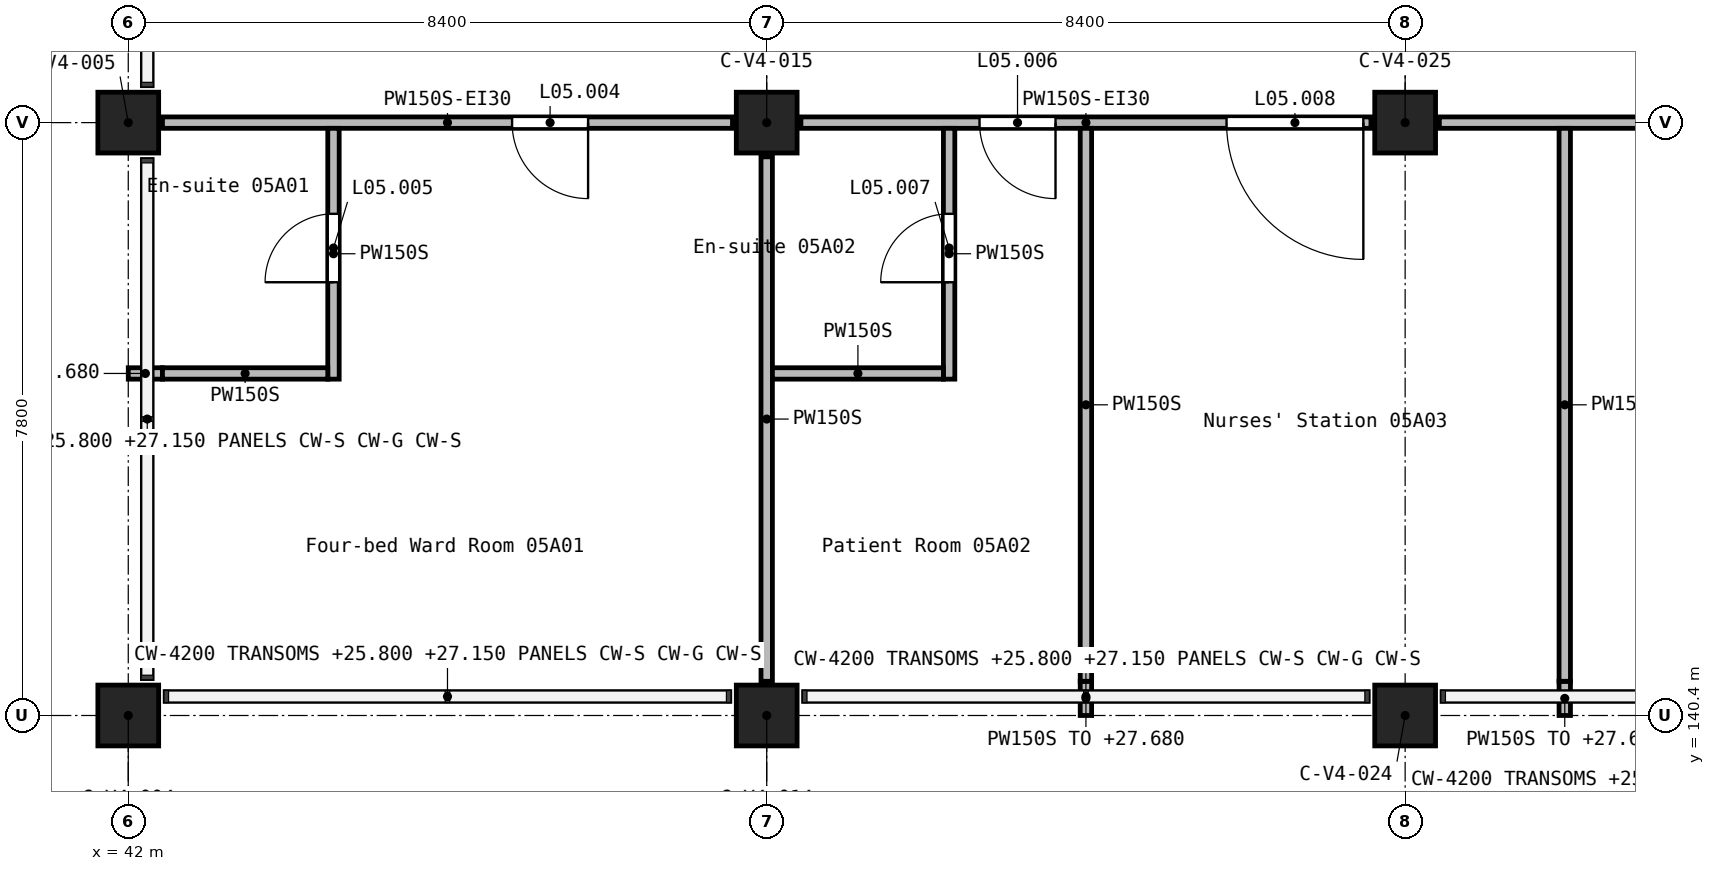
"""IFC4 building model, lengths in metres.
Left out: names, types, materials, properties, quantities, classifications, styles, units other than length and angle.
Written with IfcOpenShell. Run it as: python <this file> out.ifc"""

import sys

from ifc_helpers import new_model, si_unit, direction, frame, frame_2d, origin, origin_2d, place, context, subcontext, project, spatial, rectangle, extrude, element, fill, save


model = new_model("IFC4")
c1 = context("Model", 3, precision=1e-05, world=origin(), true_north=direction((0.0, 1.0)))
c2 = subcontext(c1, "Body", "Model", "MODEL_VIEW")
j1 = project(units=[si_unit("LENGTHUNIT", "METRE"), si_unit("PLANEANGLEUNIT", "RADIAN")], contexts=[c1])
p1 = place(None, origin())
s1 = spatial("IfcSite", under=j1, at=p1, CompositionType="ELEMENT")
p2 = place(p1, origin())
s2 = spatial("IfcBuilding", under=s1, at=p2, CompositionType="ELEMENT")
p3 = place(p2, frame((0.0, 0.0, 24.9)))
s3 = spatial("IfcBuildingStorey", under=s2, at=p3, CompositionType="ELEMENT", Elevation=24.9)
for number, where, z_axis, x_axis in (
    (1, (42.0, 140.4, 0.0), (0.0, 0.0, 1.0), (1.0, 0.0, 0.0)),
    (2, (42.0, 148.2, 0.0), (0.0, 0.0, 1.0), (1.0, 0.0, 0.0)),
    (3, (50.4, 140.4, 0.0), (0.0, 0.0, 1.0), (1.0, 0.0, 0.0)),
    (4, (50.4, 148.2, 0.0), (0.0, 0.0, 1.0), (1.0, 0.0, 0.0)),
    (5, (58.8, 140.4, 0.0), (0.0, 0.0, 1.0), (1.0, 0.0, 0.0)),
    (6, (58.8, 148.2, 0.0), (0.0, 0.0, 1.0), (1.0, 0.0, 0.0)),
):
    element("IfcColumn", number, at=place(p3, frame(where, z_axis=z_axis, x_axis=x_axis)), inside=s3, PredefinedType="COLUMN", context=c2, shape_type="SweptSolid", body=[
        extrude(rectangle(XDim=0.8, YDim=0.8, at=origin_2d()), origin(), (0.0, 0.0, 1.0), 3.9),
    ])
p4 = place(p3, frame((66.75, 148.2, 0.0), z_axis=(0.0, 0.0, 1.0), x_axis=(-1.0, 0.0, 0.0)))
e7 = element("IfcWall", 7, at=p4, inside=s3, PredefinedType="PARTITIONING", context=c2, shape_type="SweptSolid", body=[
    extrude(rectangle(XDim=7.5, YDim=0.15, at=frame_2d((3.75, 0.0))), origin(), (0.0, 0.0, 1.0), 3.6),
])
p5 = place(p4, frame((3.55, 0.0, 0.0)))
e8 = element("IfcOpeningElement", 8, at=p5, cuts=e7, PredefinedType="OPENING", context=c2, shape_type="SweptSolid", body=[
    extrude(rectangle(XDim=1.0, YDim=2.1, at=frame_2d((0.5, 1.05))), frame((0.0, 0.085, 0.0), z_axis=(0.0, -1.0, 0.0), x_axis=(1.0, 0.0, 0.0)), (0.0, 0.0, 1.0), 0.17),
])
p6 = place(p3, frame((58.35, 148.2, 0.0), z_axis=(0.0, 0.0, 1.0), x_axis=(-1.0, 0.0, 0.0)))
e9 = element("IfcWall", 9, at=p6, inside=s3, PredefinedType="PARTITIONING", context=c2, shape_type="SweptSolid", body=[
    extrude(rectangle(XDim=7.5, YDim=0.15, at=frame_2d((3.75, 0.0))), origin(), (0.0, 0.0, 1.0), 3.6),
])
p7 = place(p6, frame((4.15, 0.0, 0.0)))
e10 = element("IfcOpeningElement", 10, at=p7, cuts=e9, PredefinedType="OPENING", context=c2, shape_type="SweptSolid", body=[
    extrude(rectangle(XDim=1.0, YDim=2.1, at=frame_2d((0.5, 1.05))), frame((0.0, 0.085, 0.0), z_axis=(0.0, -1.0, 0.0), x_axis=(1.0, 0.0, 0.0)), (0.0, 0.0, 1.0), 0.17),
])
p8 = place(p6, frame((0.1, 0.0, 0.0)))
e11 = element("IfcOpeningElement", 11, at=p8, cuts=e9, PredefinedType="OPENING", context=c2, shape_type="SweptSolid", body=[
    extrude(rectangle(XDim=1.8, YDim=2.1, at=frame_2d((0.9, 1.05))), frame((0.0, 0.085, 0.0), z_axis=(0.0, -1.0, 0.0), x_axis=(1.0, 0.0, 0.0)), (0.0, 0.0, 1.0), 0.17),
])
p9 = place(p3, frame((49.95, 148.2, 0.0), z_axis=(0.0, 0.0, 1.0), x_axis=(-1.0, 0.0, 0.0)))
e12 = element("IfcWall", 12, at=p9, inside=s3, PredefinedType="PARTITIONING", context=c2, shape_type="SweptSolid", body=[
    extrude(rectangle(XDim=7.5, YDim=0.15, at=frame_2d((3.75, 0.0))), origin(), (0.0, 0.0, 1.0), 3.6),
])
p10 = place(p9, frame((1.9, 0.0, 0.0)))
e13 = element("IfcOpeningElement", 13, at=p10, cuts=e12, PredefinedType="OPENING", context=c2, shape_type="SweptSolid", body=[
    extrude(rectangle(XDim=1.0, YDim=2.1, at=frame_2d((0.5, 1.05))), frame((0.0, 0.085, 0.0), z_axis=(0.0, -1.0, 0.0), x_axis=(1.0, 0.0, 0.0)), (0.0, 0.0, 1.0), 0.17),
])
p11 = place(p3, frame((50.4, 140.85, 0.0), z_axis=(0.0, 0.0, 1.0), x_axis=(0.0, 1.0, 0.0)))
e14 = element("IfcWall", 14, at=p11, inside=s3, PredefinedType="PARTITIONING", context=c2, shape_type="SweptSolid", body=[
    extrude(rectangle(XDim=6.9, YDim=0.15, at=frame_2d((3.45, 0.0))), origin(), (0.0, 0.0, 1.0), 3.6),
])
p12 = place(p3, frame((54.6, 140.4, 0.0), z_axis=(0.0, 0.0, 1.0), x_axis=(0.0, 1.0, 0.0)))
e15 = element("IfcWall", 15, at=p12, inside=s3, PredefinedType="PARTITIONING", context=c2, shape_type="SweptSolid", body=[
    extrude(rectangle(XDim=0.45, YDim=0.15, at=frame_2d((0.225, 0.0))), origin(), (0.0, 0.0, 1.0), 2.78),
])
p13 = place(p3, frame((54.6, 140.85, 0.0), z_axis=(0.0, 0.0, 1.0), x_axis=(0.0, 1.0, 0.0)))
e16 = element("IfcWall", 16, at=p13, inside=s3, PredefinedType="PARTITIONING", context=c2, shape_type="SweptSolid", body=[
    extrude(rectangle(XDim=7.275, YDim=0.15, at=frame_2d((3.637, 0.0))), origin(), (0.0, 0.0, 1.0), 3.6),
])
p14 = place(p3, frame((60.9, 140.4, 0.0), z_axis=(0.0, 0.0, 1.0), x_axis=(0.0, 1.0, 0.0)))
e17 = element("IfcWall", 17, at=p14, inside=s3, PredefinedType="PARTITIONING", context=c2, shape_type="SweptSolid", body=[
    extrude(rectangle(XDim=0.45, YDim=0.15, at=frame_2d((0.225, 0.0))), origin(), (0.0, 0.0, 1.0), 2.78),
])
p15 = place(p3, frame((60.9, 140.85, 0.0), z_axis=(0.0, 0.0, 1.0), x_axis=(0.0, 1.0, 0.0)))
e18 = element("IfcWall", 18, at=p15, inside=s3, PredefinedType="PARTITIONING", context=c2, shape_type="SweptSolid", body=[
    extrude(rectangle(XDim=7.275, YDim=0.15, at=frame_2d((3.637, 0.0))), origin(), (0.0, 0.0, 1.0), 3.6),
])
p16 = place(p3, frame((44.7, 144.825, 0.0), z_axis=(0.0, 0.0, 1.0), x_axis=(0.0, 1.0, 0.0)))
e19 = element("IfcWall", 19, at=p16, inside=s3, PredefinedType="PARTITIONING", context=c2, shape_type="SweptSolid", body=[
    extrude(rectangle(XDim=3.3, YDim=0.15, at=frame_2d((1.65, 0.0))), origin(), (0.0, 0.0, 1.0), 3.6),
])
p17 = place(p16, frame((1.275, 0.0, 0.0)))
e20 = element("IfcOpeningElement", 20, at=p17, cuts=e19, PredefinedType="OPENING", context=c2, shape_type="SweptSolid", body=[
    extrude(rectangle(XDim=0.9, YDim=2.1, at=frame_2d((0.45, 1.05))), frame((0.0, 0.085, 0.0), z_axis=(0.0, -1.0, 0.0), x_axis=(1.0, 0.0, 0.0)), (0.0, 0.0, 1.0), 0.17),
])
p18 = place(p3, frame((52.8, 144.825, 0.0), z_axis=(0.0, 0.0, 1.0), x_axis=(0.0, 1.0, 0.0)))
e21 = element("IfcWall", 21, at=p18, inside=s3, PredefinedType="PARTITIONING", context=c2, shape_type="SweptSolid", body=[
    extrude(rectangle(XDim=3.3, YDim=0.15, at=frame_2d((1.65, 0.0))), origin(), (0.0, 0.0, 1.0), 3.6),
])
p19 = place(p18, frame((1.275, 0.0, 0.0)))
e22 = element("IfcOpeningElement", 22, at=p19, cuts=e21, PredefinedType="OPENING", context=c2, shape_type="SweptSolid", body=[
    extrude(rectangle(XDim=0.9, YDim=2.1, at=frame_2d((0.45, 1.05))), frame((0.0, 0.085, 0.0), z_axis=(0.0, -1.0, 0.0), x_axis=(1.0, 0.0, 0.0)), (0.0, 0.0, 1.0), 0.17),
])
p20 = place(p3, frame((42.0, 144.9, 0.0), z_axis=(0.0, 0.0, 1.0), x_axis=(1.0, 0.0, 0.0)))
e23 = element("IfcWall", 23, at=p20, inside=s3, PredefinedType="PARTITIONING", context=c2, shape_type="SweptSolid", body=[
    extrude(rectangle(XDim=0.45, YDim=0.15, at=frame_2d((0.225, 0.0))), origin(), (0.0, 0.0, 1.0), 2.78),
])
p21 = place(p3, frame((42.45, 144.9, 0.0), z_axis=(0.0, 0.0, 1.0), x_axis=(1.0, 0.0, 0.0)))
e24 = element("IfcWall", 24, at=p21, inside=s3, PredefinedType="PARTITIONING", context=c2, shape_type="SweptSolid", body=[
    extrude(rectangle(XDim=2.175, YDim=0.15, at=frame_2d((1.087, 0.0))), origin(), (0.0, 0.0, 1.0), 3.6),
])
p22 = place(p3, frame((50.475, 144.9, 0.0), z_axis=(0.0, 0.0, 1.0), x_axis=(1.0, 0.0, 0.0)))
e25 = element("IfcWall", 25, at=p22, inside=s3, PredefinedType="PARTITIONING", context=c2, shape_type="SweptSolid", body=[
    extrude(rectangle(XDim=2.25, YDim=0.15, at=frame_2d((1.125, 0.0))), origin(), (0.0, 0.0, 1.0), 3.6),
])
p23 = place(p10, origin())
e26 = element("IfcDoor", 26, at=p23, inside=s3, OperationType="SINGLE_SWING_LEFT", PredefinedType="DOOR", context=c2, shape_type="SweptSolid", body=[
    extrude(rectangle(XDim=1.0, YDim=2.1, at=frame_2d((0.5, 1.05))), frame((0.0, 0.025, 0.0), z_axis=(0.0, -1.0, 0.0), x_axis=(1.0, 0.0, 0.0)), (0.0, 0.0, 1.0), 0.05),
])
fill(e13, e26)
p24 = place(p17, origin())
e27 = element("IfcDoor", 27, at=p24, inside=s3, OperationType="SINGLE_SWING_RIGHT", PredefinedType="DOOR", context=c2, shape_type="SweptSolid", body=[
    extrude(rectangle(XDim=0.9, YDim=2.1, at=frame_2d((0.45, 1.05))), frame((0.0, 0.025, 0.0), z_axis=(0.0, -1.0, 0.0), x_axis=(1.0, 0.0, 0.0)), (0.0, 0.0, 1.0), 0.05),
])
fill(e20, e27)
p25 = place(p7, origin())
e28 = element("IfcDoor", 28, at=p25, inside=s3, OperationType="SINGLE_SWING_RIGHT", PredefinedType="DOOR", context=c2, shape_type="SweptSolid", body=[
    extrude(rectangle(XDim=1.0, YDim=2.1, at=frame_2d((0.5, 1.05))), frame((0.0, 0.025, 0.0), z_axis=(0.0, -1.0, 0.0), x_axis=(1.0, 0.0, 0.0)), (0.0, 0.0, 1.0), 0.05),
])
fill(e10, e28)
p26 = place(p19, origin())
e29 = element("IfcDoor", 29, at=p26, inside=s3, OperationType="SINGLE_SWING_RIGHT", PredefinedType="DOOR", context=c2, shape_type="SweptSolid", body=[
    extrude(rectangle(XDim=0.9, YDim=2.1, at=frame_2d((0.45, 1.05))), frame((0.0, 0.025, 0.0), z_axis=(0.0, -1.0, 0.0), x_axis=(1.0, 0.0, 0.0)), (0.0, 0.0, 1.0), 0.05),
])
fill(e22, e29)
p27 = place(p8, origin())
e30 = element("IfcDoor", 30, at=p27, inside=s3, OperationType="DOUBLE_DOOR_SINGLE_SWING", PredefinedType="DOOR", context=c2, shape_type="SweptSolid", body=[
    extrude(rectangle(XDim=1.8, YDim=2.1, at=frame_2d((0.9, 1.05))), frame((0.0, 0.025, 0.0), z_axis=(0.0, -1.0, 0.0), x_axis=(1.0, 0.0, 0.0)), (0.0, 0.0, 1.0), 0.05),
])
fill(e11, e30)
save(model, sys.argv[1])
